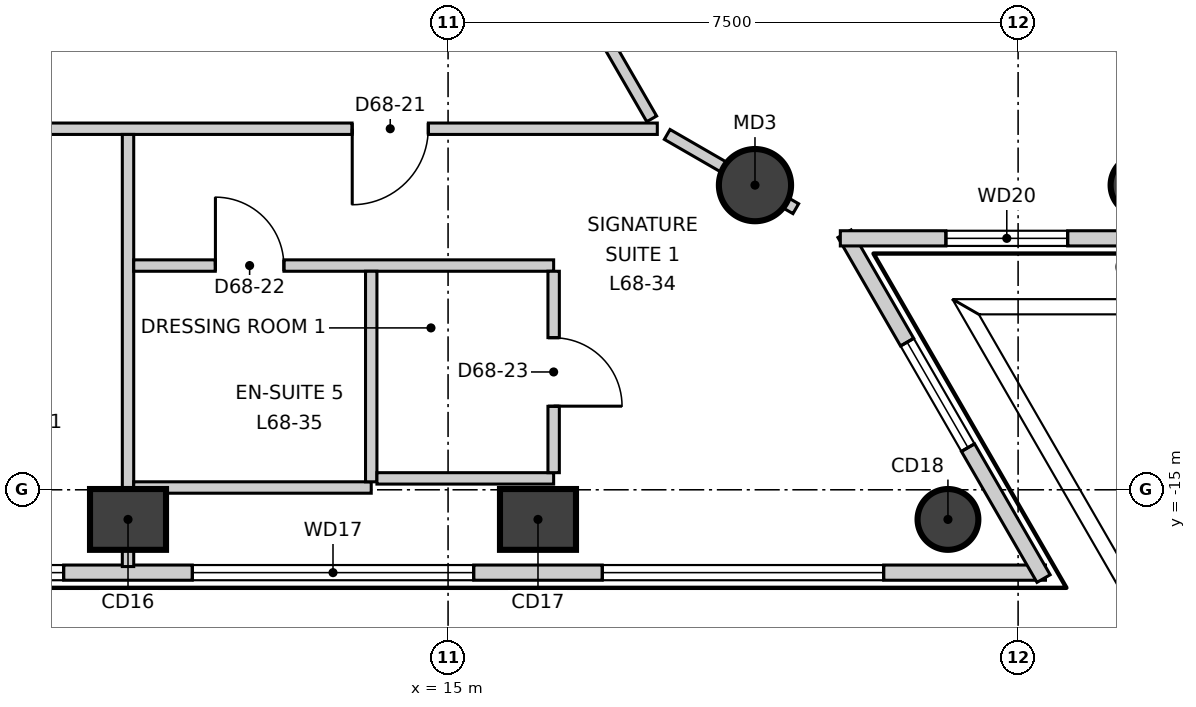
"""IFC4 building model, lengths in metres.
Left out: names, types, materials, properties, quantities, classifications, styles, units other than length and angle.
Written with IfcOpenShell. Run it as: python <this file> out.ifc"""

import sys

from ifc_helpers import new_model, si_unit, direction, frame, frame_2d, origin, origin_2d, place, context, subcontext, project, spatial, rectangle, circle, extrude, element, fill, save


model = new_model("IFC4")
c1 = context("Model", 3, precision=1e-05, world=origin(), true_north=direction((0.0, 1.0)))
c2 = subcontext(c1, "Body", "Model", "MODEL_VIEW")
j1 = project(units=[si_unit("LENGTHUNIT", "METRE"), si_unit("PLANEANGLEUNIT", "RADIAN")], contexts=[c1])
p1 = place(None, origin())
s1 = spatial("IfcSite", under=j1, at=p1, CompositionType="ELEMENT")
p2 = place(p1, origin())
s2 = spatial("IfcBuilding", under=s1, at=p2, CompositionType="ELEMENT")
p3 = place(p2, frame((0.0, 0.0, 289.9)))
s3 = spatial("IfcBuildingStorey", under=s2, at=p3, CompositionType="ELEMENT", Elevation=289.9)
for number, where, z_axis, x_axis in (
    (1, (10.789, -15.39, -0.3), (0.0, 0.0, 1.0), (1.0, 0.0, 0.0)),
    (2, (16.183, -15.39, -0.3), (0.0, 0.0, 1.0), (1.0, 0.0, 0.0)),
):
    element("IfcColumn", number, at=place(p3, frame(where, z_axis=z_axis, x_axis=x_axis)), inside=s3, PredefinedType="COLUMN", context=c2, shape_type="SweptSolid", body=[
        extrude(rectangle(XDim=1.0, YDim=0.8, at=origin_2d()), origin(), (0.0, 0.0, 1.0), 3.6),
    ])
for number, where, z_axis, x_axis in (
    (3, (21.577, -15.39, -0.3), (0.0, 0.0, 1.0), (1.0, 0.0, 0.0)),
    (4, (24.117, -10.992, -0.3), (0.0, 0.0, 1.0), (-0.5, 0.866, 0.0)),
):
    element("IfcColumn", number, at=place(p3, frame(where, z_axis=z_axis, x_axis=x_axis)), inside=s3, PredefinedType="COLUMN", context=c2, shape_type="SweptSolid", body=[
        extrude(circle(Radius=0.4, at=origin_2d()), origin(), (0.0, 0.0, 1.0), 3.6),
    ])
p4 = place(p3, frame((19.038, -10.992, -0.3), z_axis=(0.0, 0.0, 1.0), x_axis=(1.0, 0.0, 0.0)))
e5 = element("IfcColumn", 5, at=p4, inside=s3, PredefinedType="COLUMN", context=c2, shape_type="SweptSolid", body=[
    extrude(circle(Radius=0.475, at=origin_2d()), origin(), (0.0, 0.0, 1.0), 3.6),
])
p5 = place(p3, frame((-22.88, -16.09, 0.0), z_axis=(0.0, 0.0, 1.0), x_axis=(1.0, 0.0, 0.0)))
e6 = element("IfcWall", 6, at=p5, inside=s3, PredefinedType="ELEMENTEDWALL", context=c2, shape_type="SweptSolid", body=[
    extrude(rectangle(XDim=45.74, YDim=0.2, at=frame_2d((22.87, 0.0))), origin(), (0.0, 0.0, 1.0), 3.3),
])
p6 = place(p5, frame((2.15, 0.0, 0.9)))
e7 = element("IfcOpeningElement", 7, at=p6, cuts=e6, PredefinedType="OPENING", context=c2, shape_type="SweptSolid", body=[
    extrude(rectangle(XDim=3.7, YDim=2.2, at=frame_2d((1.85, 1.1))), frame((0.0, 0.11, 0.0), z_axis=(0.0, -1.0, 0.0), x_axis=(1.0, 0.0, 0.0)), (0.0, 0.0, 1.0), 0.22),
])
p7 = place(p5, frame((7.544, 0.0, 0.9)))
e8 = element("IfcOpeningElement", 8, at=p7, cuts=e6, PredefinedType="OPENING", context=c2, shape_type="SweptSolid", body=[
    extrude(rectangle(XDim=3.7, YDim=2.2, at=frame_2d((1.85, 1.1))), frame((0.0, 0.11, 0.0), z_axis=(0.0, -1.0, 0.0), x_axis=(1.0, 0.0, 0.0)), (0.0, 0.0, 1.0), 0.22),
])
p8 = place(p5, frame((12.939, 0.0, 0.9)))
e9 = element("IfcOpeningElement", 9, at=p8, cuts=e6, PredefinedType="OPENING", context=c2, shape_type="SweptSolid", body=[
    extrude(rectangle(XDim=3.7, YDim=2.2, at=frame_2d((1.85, 1.1))), frame((0.0, 0.11, 0.0), z_axis=(0.0, -1.0, 0.0), x_axis=(1.0, 0.0, 0.0)), (0.0, 0.0, 1.0), 0.22),
])
p9 = place(p5, frame((18.333, 0.0, 0.9)))
e10 = element("IfcOpeningElement", 10, at=p9, cuts=e6, PredefinedType="OPENING", context=c2, shape_type="SweptSolid", body=[
    extrude(rectangle(XDim=3.7, YDim=2.2, at=frame_2d((1.85, 1.1))), frame((0.0, 0.11, 0.0), z_axis=(0.0, -1.0, 0.0), x_axis=(1.0, 0.0, 0.0)), (0.0, 0.0, 1.0), 0.22),
])
p10 = place(p5, frame((23.727, 0.0, 0.9)))
e11 = element("IfcOpeningElement", 11, at=p10, cuts=e6, PredefinedType="OPENING", context=c2, shape_type="SweptSolid", body=[
    extrude(rectangle(XDim=3.7, YDim=2.2, at=frame_2d((1.85, 1.1))), frame((0.0, 0.11, 0.0), z_axis=(0.0, -1.0, 0.0), x_axis=(1.0, 0.0, 0.0)), (0.0, 0.0, 1.0), 0.22),
])
p11 = place(p5, frame((29.121, 0.0, 0.9)))
e12 = element("IfcOpeningElement", 12, at=p11, cuts=e6, PredefinedType="OPENING", context=c2, shape_type="SweptSolid", body=[
    extrude(rectangle(XDim=3.7, YDim=2.2, at=frame_2d((1.85, 1.1))), frame((0.0, 0.11, 0.0), z_axis=(0.0, -1.0, 0.0), x_axis=(1.0, 0.0, 0.0)), (0.0, 0.0, 1.0), 0.22),
])
p12 = place(p5, frame((34.516, 0.0, 0.9)))
e13 = element("IfcOpeningElement", 13, at=p12, cuts=e6, PredefinedType="OPENING", context=c2, shape_type="SweptSolid", body=[
    extrude(rectangle(XDim=3.7, YDim=2.2, at=frame_2d((1.85, 1.1))), frame((0.0, 0.11, 0.0), z_axis=(0.0, -1.0, 0.0), x_axis=(1.0, 0.0, 0.0)), (0.0, 0.0, 1.0), 0.22),
])
p13 = place(p5, frame((39.91, 0.0, 0.9)))
e14 = element("IfcOpeningElement", 14, at=p13, cuts=e6, PredefinedType="OPENING", context=c2, shape_type="SweptSolid", body=[
    extrude(rectangle(XDim=3.7, YDim=2.2, at=frame_2d((1.85, 1.1))), frame((0.0, 0.11, 0.0), z_axis=(0.0, -1.0, 0.0), x_axis=(1.0, 0.0, 0.0)), (0.0, 0.0, 1.0), 0.22),
])
p14 = place(p3, frame((22.835, -16.168, 0.0), z_axis=(0.0, 0.0, 1.0), x_axis=(-0.499933584342, 0.866063745487, 0.0)))
e15 = element("IfcWall", 15, at=p14, inside=s3, PredefinedType="ELEMENTEDWALL", context=c2, shape_type="SweptSolid", body=[
    extrude(rectangle(XDim=5.239, YDim=0.2, at=frame_2d((2.619, 0.0))), origin(), (0.0, 0.0, 1.0), 3.3),
])
p15 = place(p14, frame((1.99, 0.0, 0.9)))
e16 = element("IfcOpeningElement", 16, at=p15, cuts=e15, PredefinedType="OPENING", context=c2, shape_type="SweptSolid", body=[
    extrude(rectangle(XDim=1.6, YDim=2.2, at=frame_2d((0.8, 1.1))), frame((0.0, 0.11, 0.0), z_axis=(0.0, -1.0, 0.0), x_axis=(1.0, 0.0, 0.0)), (0.0, 0.0, 1.0), 0.22),
])
p16 = place(p3, frame((20.161, -11.692, 0.0), z_axis=(0.0, 0.0, 1.0), x_axis=(1.0, 0.0, 0.0)))
e17 = element("IfcWall", 17, at=p16, inside=s3, PredefinedType="ELEMENTEDWALL", context=c2, shape_type="SweptSolid", body=[
    extrude(rectangle(XDim=5.239, YDim=0.2, at=frame_2d((2.62, 0.0))), origin(), (0.0, 0.0, 1.0), 3.3),
])
p17 = place(p16, frame((1.39, 0.0, 0.9)))
e18 = element("IfcOpeningElement", 18, at=p17, cuts=e17, PredefinedType="OPENING", context=c2, shape_type="SweptSolid", body=[
    extrude(rectangle(XDim=1.6, YDim=2.2, at=frame_2d((0.8, 1.1))), frame((0.0, 0.11, 0.0), z_axis=(0.0, -1.0, 0.0), x_axis=(1.0, 0.0, 0.0)), (0.0, 0.0, 1.0), 0.22),
])
p18 = place(p3, frame((25.375, -11.77, 0.0), z_axis=(0.0, 0.0, 1.0), x_axis=(-0.500008134474, 0.866020707292, 0.0)))
e19 = element("IfcWall", 19, at=p18, inside=s3, PredefinedType="ELEMENTEDWALL", context=c2, shape_type="SweptSolid", body=[
    extrude(rectangle(XDim=45.741, YDim=0.2, at=frame_2d((22.871, 0.0))), origin(), (0.0, 0.0, 1.0), 3.3),
])
p19 = place(p18, frame((2.15, 0.0, 0.9)))
e20 = element("IfcOpeningElement", 20, at=p19, cuts=e19, PredefinedType="OPENING", context=c2, shape_type="SweptSolid", body=[
    extrude(rectangle(XDim=3.7, YDim=2.2, at=frame_2d((1.85, 1.1))), frame((0.0, 0.11, 0.0), z_axis=(0.0, -1.0, 0.0), x_axis=(1.0, 0.0, 0.0)), (0.0, 0.0, 1.0), 0.22),
])
p20 = place(p18, frame((7.544, 0.0, 0.9)))
e21 = element("IfcOpeningElement", 21, at=p20, cuts=e19, PredefinedType="OPENING", context=c2, shape_type="SweptSolid", body=[
    extrude(rectangle(XDim=3.7, YDim=2.2, at=frame_2d((1.85, 1.1))), frame((0.0, 0.11, 0.0), z_axis=(0.0, -1.0, 0.0), x_axis=(1.0, 0.0, 0.0)), (0.0, 0.0, 1.0), 0.22),
])
p21 = place(p18, frame((12.939, 0.0, 0.9)))
e22 = element("IfcOpeningElement", 22, at=p21, cuts=e19, PredefinedType="OPENING", context=c2, shape_type="SweptSolid", body=[
    extrude(rectangle(XDim=3.7, YDim=2.2, at=frame_2d((1.85, 1.1))), frame((0.0, 0.11, 0.0), z_axis=(0.0, -1.0, 0.0), x_axis=(1.0, 0.0, 0.0)), (0.0, 0.0, 1.0), 0.22),
])
p22 = place(p18, frame((18.333, 0.0, 0.9)))
e23 = element("IfcOpeningElement", 23, at=p22, cuts=e19, PredefinedType="OPENING", context=c2, shape_type="SweptSolid", body=[
    extrude(rectangle(XDim=3.7, YDim=2.2, at=frame_2d((1.85, 1.1))), frame((0.0, 0.11, 0.0), z_axis=(0.0, -1.0, 0.0), x_axis=(1.0, 0.0, 0.0)), (0.0, 0.0, 1.0), 0.22),
])
p23 = place(p18, frame((23.728, 0.0, 0.9)))
e24 = element("IfcOpeningElement", 24, at=p23, cuts=e19, PredefinedType="OPENING", context=c2, shape_type="SweptSolid", body=[
    extrude(rectangle(XDim=3.7, YDim=2.2, at=frame_2d((1.85, 1.1))), frame((0.0, 0.11, 0.0), z_axis=(0.0, -1.0, 0.0), x_axis=(1.0, 0.0, 0.0)), (0.0, 0.0, 1.0), 0.22),
])
p24 = place(p18, frame((29.122, 0.0, 0.9)))
e25 = element("IfcOpeningElement", 25, at=p24, cuts=e19, PredefinedType="OPENING", context=c2, shape_type="SweptSolid", body=[
    extrude(rectangle(XDim=3.7, YDim=2.2, at=frame_2d((1.85, 1.1))), frame((0.0, 0.11, 0.0), z_axis=(0.0, -1.0, 0.0), x_axis=(1.0, 0.0, 0.0)), (0.0, 0.0, 1.0), 0.22),
])
p25 = place(p18, frame((34.517, 0.0, 0.9)))
e26 = element("IfcOpeningElement", 26, at=p25, cuts=e19, PredefinedType="OPENING", context=c2, shape_type="SweptSolid", body=[
    extrude(rectangle(XDim=3.7, YDim=2.2, at=frame_2d((1.85, 1.1))), frame((0.0, 0.11, 0.0), z_axis=(0.0, -1.0, 0.0), x_axis=(1.0, 0.0, 0.0)), (0.0, 0.0, 1.0), 0.22),
])
p26 = place(p18, frame((39.911, 0.0, 0.9)))
e27 = element("IfcOpeningElement", 27, at=p26, cuts=e19, PredefinedType="OPENING", context=c2, shape_type="SweptSolid", body=[
    extrude(rectangle(XDim=3.7, YDim=2.2, at=frame_2d((1.85, 1.1))), frame((0.0, 0.11, 0.0), z_axis=(0.0, -1.0, 0.0), x_axis=(1.0, 0.0, 0.0)), (0.0, 0.0, 1.0), 0.22),
])
p27 = place(p3, frame((-17.603, -10.25, 0.0), z_axis=(0.0, 0.0, 1.0), x_axis=(1.0, 0.0, 0.0)))
e28 = element("IfcWall", 28, at=p27, inside=s3, PredefinedType="PARTITIONING", context=c2, shape_type="SweptSolid", body=[
    extrude(rectangle(XDim=35.356, YDim=0.15, at=frame_2d((17.678, 0.0))), origin(), (0.0, 0.0, 1.0), 3.3),
])
p28 = place(p27, frame((2.8, 0.0, 0.0)))
e29 = element("IfcOpeningElement", 29, at=p28, cuts=e28, PredefinedType="OPENING", context=c2, shape_type="SweptSolid", body=[
    extrude(rectangle(XDim=1.0, YDim=2.1, at=frame_2d((0.5, 1.05))), frame((0.0, 0.085, 0.0), z_axis=(0.0, -1.0, 0.0), x_axis=(1.0, 0.0, 0.0)), (0.0, 0.0, 1.0), 0.17),
])
p29 = place(p27, frame((15.065, 0.0, 0.0)))
e30 = element("IfcOpeningElement", 30, at=p29, cuts=e28, PredefinedType="OPENING", context=c2, shape_type="SweptSolid", body=[
    extrude(rectangle(XDim=1.0, YDim=2.1, at=frame_2d((0.5, 1.05))), frame((0.0, 0.085, 0.0), z_axis=(0.0, -1.0, 0.0), x_axis=(1.0, 0.0, 0.0)), (0.0, 0.0, 1.0), 0.17),
])
p30 = place(p27, frame((9.765, 0.0, 0.0)))
e31 = element("IfcOpeningElement", 31, at=p30, cuts=e28, PredefinedType="OPENING", context=c2, shape_type="SweptSolid", body=[
    extrude(rectangle(XDim=0.9, YDim=2.1, at=frame_2d((0.45, 1.05))), frame((0.0, 0.085, 0.0), z_axis=(0.0, -1.0, 0.0), x_axis=(1.0, 0.0, 0.0)), (0.0, 0.0, 1.0), 0.17),
])
p31 = place(p27, frame((11.965, 0.0, 0.0)))
e32 = element("IfcOpeningElement", 32, at=p31, cuts=e28, PredefinedType="OPENING", context=c2, shape_type="SweptSolid", body=[
    extrude(rectangle(XDim=0.9, YDim=2.1, at=frame_2d((0.45, 1.05))), frame((0.0, 0.085, 0.0), z_axis=(0.0, -1.0, 0.0), x_axis=(1.0, 0.0, 0.0)), (0.0, 0.0, 1.0), 0.17),
])
p32 = place(p27, frame((20.953, 0.0, 0.0)))
e33 = element("IfcOpeningElement", 33, at=p32, cuts=e28, PredefinedType="OPENING", context=c2, shape_type="SweptSolid", body=[
    extrude(rectangle(XDim=1.0, YDim=2.1, at=frame_2d((0.5, 1.05))), frame((0.0, 0.085, 0.0), z_axis=(0.0, -1.0, 0.0), x_axis=(1.0, 0.0, 0.0)), (0.0, 0.0, 1.0), 0.17),
])
p33 = place(p27, frame((26.347, 0.0, 0.0)))
e34 = element("IfcOpeningElement", 34, at=p33, cuts=e28, PredefinedType="OPENING", context=c2, shape_type="SweptSolid", body=[
    extrude(rectangle(XDim=1.0, YDim=2.1, at=frame_2d((0.5, 1.05))), frame((0.0, 0.085, 0.0), z_axis=(0.0, -1.0, 0.0), x_axis=(1.0, 0.0, 0.0)), (0.0, 0.0, 1.0), 0.17),
])
p34 = place(p27, frame((31.342, 0.0, 0.0)))
e35 = element("IfcOpeningElement", 35, at=p34, cuts=e28, PredefinedType="OPENING", context=c2, shape_type="SweptSolid", body=[
    extrude(rectangle(XDim=1.0, YDim=2.1, at=frame_2d((0.5, 1.05))), frame((0.0, 0.085, 0.0), z_axis=(0.0, -1.0, 0.0), x_axis=(1.0, 0.0, 0.0)), (0.0, 0.0, 1.0), 0.17),
])
p35 = place(p3, frame((17.883, -10.325, 0.0), z_axis=(0.0, 0.0, 1.0), x_axis=(0.865973311606, -0.500090215447, 0.0)))
e36 = element("IfcWall", 36, at=p35, inside=s3, PredefinedType="PARTITIONING", context=c2, shape_type="SweptSolid", body=[
    extrude(rectangle(XDim=1.954, YDim=0.15, at=frame_2d((0.977, 0.0))), origin(), (0.0, 0.0, 1.0), 2.8),
])
p36 = place(p3, frame((0.075, 20.37, 0.0), z_axis=(0.0, 0.0, 1.0), x_axis=(0.500009775255, -0.866019759965, 0.0)))
e37 = element("IfcWall", 37, at=p36, inside=s3, PredefinedType="PARTITIONING", context=c2, shape_type="SweptSolid", body=[
    extrude(rectangle(XDim=35.207, YDim=0.15, at=frame_2d((17.604, 0.0))), origin(), (0.0, 0.0, 1.0), 3.3),
])
p37 = place(p36, frame((31.407, 0.0, 0.0)))
e38 = element("IfcOpeningElement", 38, at=p37, cuts=e37, PredefinedType="OPENING", context=c2, shape_type="SweptSolid", body=[
    extrude(rectangle(XDim=1.0, YDim=2.1, at=frame_2d((0.5, 1.05))), frame((0.0, 0.085, 0.0), z_axis=(0.0, -1.0, 0.0), x_axis=(1.0, 0.0, 0.0)), (0.0, 0.0, 1.0), 0.17),
])
p38 = place(p36, frame((19.243, 0.0, 0.0)))
e39 = element("IfcOpeningElement", 39, at=p38, cuts=e37, PredefinedType="OPENING", context=c2, shape_type="SweptSolid", body=[
    extrude(rectangle(XDim=1.0, YDim=2.1, at=frame_2d((0.5, 1.05))), frame((0.0, 0.085, 0.0), z_axis=(0.0, -1.0, 0.0), x_axis=(1.0, 0.0, 0.0)), (0.0, 0.0, 1.0), 0.17),
])
p39 = place(p36, frame((24.543, 0.0, 0.0)))
e40 = element("IfcOpeningElement", 40, at=p39, cuts=e37, PredefinedType="OPENING", context=c2, shape_type="SweptSolid", body=[
    extrude(rectangle(XDim=0.9, YDim=2.1, at=frame_2d((0.45, 1.05))), frame((0.0, 0.085, 0.0), z_axis=(0.0, -1.0, 0.0), x_axis=(1.0, 0.0, 0.0)), (0.0, 0.0, 1.0), 0.17),
])
p40 = place(p36, frame((22.443, 0.0, 0.0)))
e41 = element("IfcOpeningElement", 41, at=p40, cuts=e37, PredefinedType="OPENING", context=c2, shape_type="SweptSolid", body=[
    extrude(rectangle(XDim=0.9, YDim=2.1, at=frame_2d((0.45, 1.05))), frame((0.0, 0.085, 0.0), z_axis=(0.0, -1.0, 0.0), x_axis=(1.0, 0.0, 0.0)), (0.0, 0.0, 1.0), 0.17),
])
p41 = place(p36, frame((13.253, 0.0, 0.0)))
e42 = element("IfcOpeningElement", 42, at=p41, cuts=e37, PredefinedType="OPENING", context=c2, shape_type="SweptSolid", body=[
    extrude(rectangle(XDim=1.0, YDim=2.1, at=frame_2d((0.5, 1.05))), frame((0.0, 0.085, 0.0), z_axis=(0.0, -1.0, 0.0), x_axis=(1.0, 0.0, 0.0)), (0.0, 0.0, 1.0), 0.17),
])
p42 = place(p36, frame((5.559, 0.0, 0.0)))
e43 = element("IfcOpeningElement", 43, at=p42, cuts=e37, PredefinedType="OPENING", context=c2, shape_type="SweptSolid", body=[
    extrude(rectangle(XDim=1.0, YDim=2.1, at=frame_2d((0.5, 1.05))), frame((0.0, 0.085, 0.0), z_axis=(0.0, -1.0, 0.0), x_axis=(1.0, 0.0, 0.0)), (0.0, 0.0, 1.0), 0.17),
])
p43 = place(p3, frame((10.789, -16.01, 0.0), z_axis=(0.0, 0.0, 1.0), x_axis=(0.0, 1.0, 0.0)))
e44 = element("IfcWall", 44, at=p43, inside=s3, PredefinedType="PARTITIONING", context=c2, shape_type="SweptSolid", body=[
    extrude(rectangle(XDim=5.685, YDim=0.15, at=frame_2d((2.843, 0.0))), origin(), (0.0, 0.0, 1.0), 3.3),
])
p44 = place(p3, frame((10.864, -12.05, 0.0), z_axis=(0.0, 0.0, 1.0), x_axis=(1.0, 0.0, 0.0)))
e45 = element("IfcWall", 45, at=p44, inside=s3, PredefinedType="PARTITIONING", context=c2, shape_type="SweptSolid", body=[
    extrude(rectangle(XDim=5.525, YDim=0.15, at=frame_2d((2.762, 0.0))), origin(), (0.0, 0.0, 1.0), 3.3),
])
p45 = place(p44, frame((1.075, 0.0, 0.0)))
e46 = element("IfcOpeningElement", 46, at=p45, cuts=e45, PredefinedType="OPENING", context=c2, shape_type="SweptSolid", body=[
    extrude(rectangle(XDim=0.9, YDim=2.1, at=frame_2d((0.45, 1.05))), frame((0.0, 0.085, 0.0), z_axis=(0.0, -1.0, 0.0), x_axis=(1.0, 0.0, 0.0)), (0.0, 0.0, 1.0), 0.17),
])
p46 = place(p3, frame((10.864, -14.97, 0.0), z_axis=(0.0, 0.0, 1.0), x_axis=(1.0, 0.0, 0.0)))
e47 = element("IfcWall", 47, at=p46, inside=s3, PredefinedType="PARTITIONING", context=c2, shape_type="SweptSolid", body=[
    extrude(rectangle(XDim=3.125, YDim=0.15, at=frame_2d((1.562, 0.0))), origin(), (0.0, 0.0, 1.0), 2.6),
])
p47 = place(p3, frame((13.989, -14.895, 0.0), z_axis=(0.0, 0.0, 1.0), x_axis=(0.0, 1.0, 0.0)))
e48 = element("IfcWall", 48, at=p47, inside=s3, PredefinedType="PARTITIONING", context=c2, shape_type="SweptSolid", body=[
    extrude(rectangle(XDim=2.77, YDim=0.15, at=frame_2d((1.385, 0.0))), origin(), (0.0, 0.0, 1.0), 3.3),
])
p48 = place(p3, frame((14.064, -14.85, 0.0), z_axis=(0.0, 0.0, 1.0), x_axis=(1.0, 0.0, 0.0)))
e49 = element("IfcWall", 49, at=p48, inside=s3, PredefinedType="PARTITIONING", context=c2, shape_type="SweptSolid", body=[
    extrude(rectangle(XDim=2.325, YDim=0.15, at=frame_2d((1.163, 0.0))), origin(), (0.0, 0.0, 1.0), 3.3),
])
p49 = place(p3, frame((16.389, -14.775, 0.0), z_axis=(0.0, 0.0, 1.0), x_axis=(0.0, 1.0, 0.0)))
e50 = element("IfcWall", 50, at=p49, inside=s3, PredefinedType="PARTITIONING", context=c2, shape_type="SweptSolid", body=[
    extrude(rectangle(XDim=2.65, YDim=0.15, at=frame_2d((1.325, 0.0))), origin(), (0.0, 0.0, 1.0), 3.3),
])
p50 = place(p49, frame((0.875, 0.0, 0.0)))
e51 = element("IfcOpeningElement", 51, at=p50, cuts=e50, PredefinedType="OPENING", context=c2, shape_type="SweptSolid", body=[
    extrude(rectangle(XDim=0.9, YDim=2.1, at=frame_2d((0.45, 1.05))), frame((0.0, 0.085, 0.0), z_axis=(0.0, -1.0, 0.0), x_axis=(1.0, 0.0, 0.0)), (0.0, 0.0, 1.0), 0.17),
])
p51 = place(p11, origin())
e52 = element("IfcWindow", 52, at=p51, inside=s3, PartitioningType="SINGLE_PANEL", PredefinedType="WINDOW", context=c2, shape_type="SweptSolid", body=[
    extrude(rectangle(XDim=3.7, YDim=2.2, at=frame_2d((1.85, 1.1))), frame((0.0, 0.03, 0.0), z_axis=(0.0, -1.0, 0.0), x_axis=(1.0, 0.0, 0.0)), (0.0, 0.0, 1.0), 0.06),
])
fill(e12, e52)
p52 = place(p12, origin())
e53 = element("IfcWindow", 53, at=p52, inside=s3, PartitioningType="SINGLE_PANEL", PredefinedType="WINDOW", context=c2, shape_type="SweptSolid", body=[
    extrude(rectangle(XDim=3.7, YDim=2.2, at=frame_2d((1.85, 1.1))), frame((0.0, 0.03, 0.0), z_axis=(0.0, -1.0, 0.0), x_axis=(1.0, 0.0, 0.0)), (0.0, 0.0, 1.0), 0.06),
])
fill(e13, e53)
p53 = place(p13, origin())
e54 = element("IfcWindow", 54, at=p53, inside=s3, PartitioningType="SINGLE_PANEL", PredefinedType="WINDOW", context=c2, shape_type="SweptSolid", body=[
    extrude(rectangle(XDim=3.7, YDim=2.2, at=frame_2d((1.85, 1.1))), frame((0.0, 0.03, 0.0), z_axis=(0.0, -1.0, 0.0), x_axis=(1.0, 0.0, 0.0)), (0.0, 0.0, 1.0), 0.06),
])
fill(e14, e54)
p54 = place(p15, origin())
e55 = element("IfcWindow", 55, at=p54, inside=s3, PartitioningType="SINGLE_PANEL", PredefinedType="WINDOW", context=c2, shape_type="SweptSolid", body=[
    extrude(rectangle(XDim=1.6, YDim=2.2, at=frame_2d((0.8, 1.1))), frame((0.0, 0.03, 0.0), z_axis=(0.0, -1.0, 0.0), x_axis=(1.0, 0.0, 0.0)), (0.0, 0.0, 1.0), 0.06),
])
fill(e16, e55)
p55 = place(p17, origin())
e56 = element("IfcWindow", 56, at=p55, inside=s3, PartitioningType="SINGLE_PANEL", PredefinedType="WINDOW", context=c2, shape_type="SweptSolid", body=[
    extrude(rectangle(XDim=1.6, YDim=2.2, at=frame_2d((0.8, 1.1))), frame((0.0, 0.03, 0.0), z_axis=(0.0, -1.0, 0.0), x_axis=(1.0, 0.0, 0.0)), (0.0, 0.0, 1.0), 0.06),
])
fill(e18, e56)
p56 = place(p19, origin())
e57 = element("IfcWindow", 57, at=p56, inside=s3, PartitioningType="SINGLE_PANEL", PredefinedType="WINDOW", context=c2, shape_type="SweptSolid", body=[
    extrude(rectangle(XDim=3.7, YDim=2.2, at=frame_2d((1.85, 1.1))), frame((0.0, 0.03, 0.0), z_axis=(0.0, -1.0, 0.0), x_axis=(1.0, 0.0, 0.0)), (0.0, 0.0, 1.0), 0.06),
])
fill(e20, e57)
p57 = place(p34, origin())
e58 = element("IfcDoor", 58, at=p57, inside=s3, OperationType="SINGLE_SWING_LEFT", PredefinedType="DOOR", context=c2, shape_type="SweptSolid", body=[
    extrude(rectangle(XDim=1.0, YDim=2.1, at=frame_2d((0.5, 1.05))), frame((0.0, 0.025, 0.0), z_axis=(0.0, -1.0, 0.0), x_axis=(1.0, 0.0, 0.0)), (0.0, 0.0, 1.0), 0.05),
])
fill(e35, e58)
p58 = place(p45, origin())
e59 = element("IfcDoor", 59, at=p58, inside=s3, OperationType="SINGLE_SWING_RIGHT", PredefinedType="DOOR", context=c2, shape_type="SweptSolid", body=[
    extrude(rectangle(XDim=0.9, YDim=2.1, at=frame_2d((0.45, 1.05))), frame((0.0, 0.025, 0.0), z_axis=(0.0, -1.0, 0.0), x_axis=(1.0, 0.0, 0.0)), (0.0, 0.0, 1.0), 0.05),
])
fill(e46, e59)
p59 = place(p50, origin())
e60 = element("IfcDoor", 60, at=p59, inside=s3, OperationType="SINGLE_SWING_LEFT", PredefinedType="DOOR", context=c2, shape_type="SweptSolid", body=[
    extrude(rectangle(XDim=0.9, YDim=2.1, at=frame_2d((0.45, 1.05))), frame((0.0, 0.025, 0.0), z_axis=(0.0, -1.0, 0.0), x_axis=(1.0, 0.0, 0.0)), (0.0, 0.0, 1.0), 0.05),
])
fill(e51, e60)
save(model, sys.argv[1])
